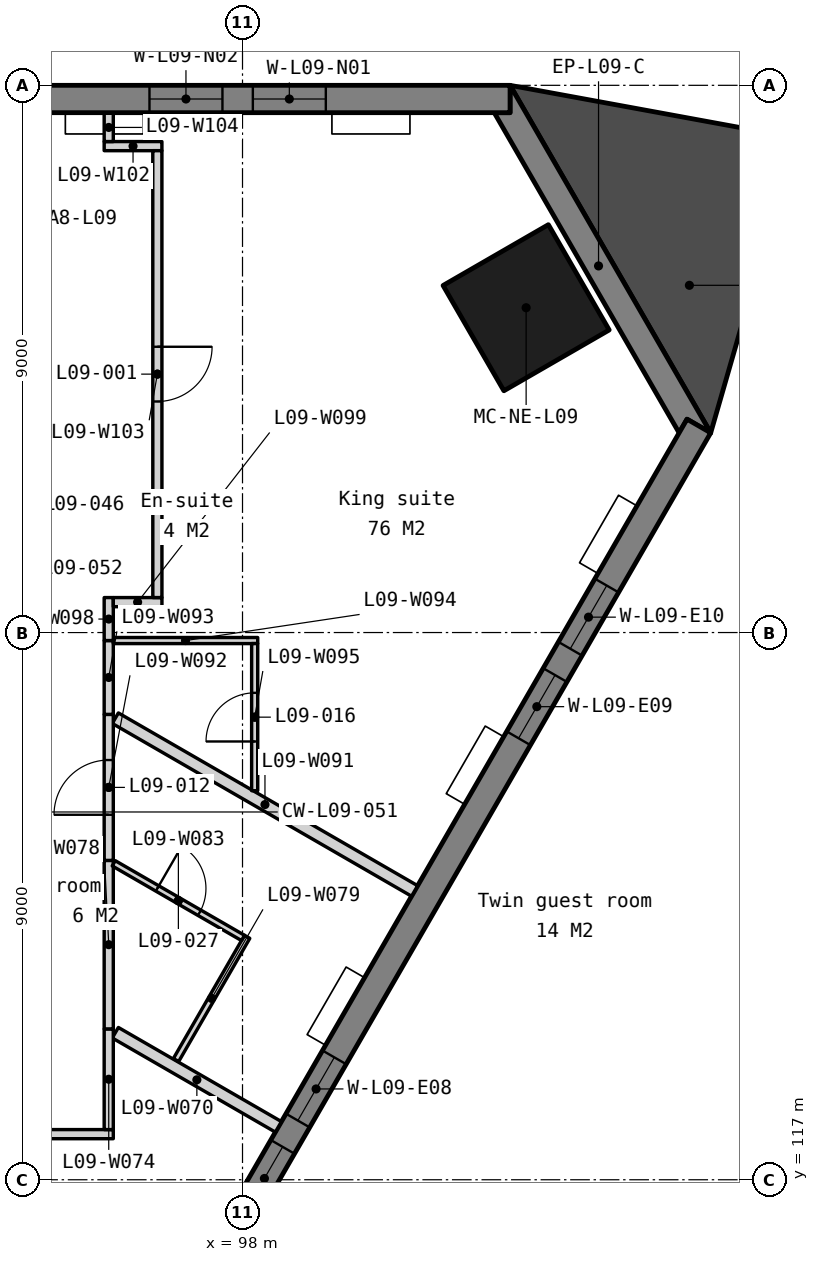
"""IFC4 building model, lengths in metres.
Left out: names, types, materials, properties, quantities, classifications, styles, units other than length and angle.
Written with IfcOpenShell. Run it as: python <this file> out.ifc"""

import sys

from ifc_helpers import new_model, si_unit, direction, frame, frame_2d, origin, origin_2d, place, context, subcontext, project, spatial, polyline, rectangle, outline, extrude, element, fill, save


model = new_model("IFC4")
c1 = context("Model", 3, precision=1e-05, world=origin(), true_north=direction((0.0, 1.0)))
c2 = subcontext(c1, "Body", "Model", "MODEL_VIEW")
j1 = project(units=[si_unit("LENGTHUNIT", "METRE"), si_unit("PLANEANGLEUNIT", "RADIAN")], contexts=[c1])
p1 = place(None, origin())
s1 = spatial("IfcSite", under=j1, at=p1, CompositionType="ELEMENT")
p2 = place(p1, origin())
s2 = spatial("IfcBuilding", under=s1, at=p2, CompositionType="ELEMENT")
p3 = place(p2, frame((0.0, 0.0, 45.5)))
s3 = spatial("IfcBuildingStorey", under=s2, at=p3, CompositionType="ELEMENT", Elevation=45.5)
p4 = place(p3, frame((102.664, 131.342, 0.0), z_axis=(0.0, 0.0, 1.0), x_axis=(-0.5, 0.866025403784, 0.0)))
e1 = element("IfcColumn", 1, at=p4, inside=s3, PredefinedType="COLUMN", context=c2, shape_type="SweptSolid", body=[
    extrude(rectangle(XDim=2.0, YDim=2.0, at=origin_2d()), origin(), (0.0, 0.0, 1.0), 3.5),
])
p5 = place(p3, frame((0.0, 0.0, -0.15)))
e2 = element("IfcWall", 2, at=p5, inside=s3, PredefinedType="SOLIDWALL", context=c2, shape_type="SweptSolid", body=[
    extrude(outline(polyline([(105.7, 129.284), (105.31, 129.509), (105.18, 129.284), (102.14, 134.55), (102.4, 134.55), (102.4, 135.0), (105.7, 129.284)])), origin(), (0.0, 0.0, 1.0), 3.5),
])
p6 = place(p3, frame((102.4, 134.775, -0.15), z_axis=(0.0, 0.0, 1.0), x_axis=(-1.0, 0.0, 0.0)))
e3 = element("IfcWall", 3, at=p6, inside=s3, PredefinedType="SOLIDWALL", context=c2, shape_type="SweptSolid", body=[
    extrude(outline(polyline([(0.0, 0.0), (0.0, 3.5), (38.62, 3.5), (38.62, 0.0), (0.0, 0.0)])), frame((0.0, 0.225, 0.0), z_axis=(0.0, -1.0, 0.0), x_axis=(1.0, 0.0, 0.0)), (0.0, 0.0, 1.0), 0.45),
])
p7 = place(p6, frame((3.03, 0.0, 1.05)))
e4 = element("IfcOpeningElement", 4, at=p7, cuts=e3, PredefinedType="OPENING", context=c2, shape_type="SweptSolid", body=[
    extrude(rectangle(XDim=1.2, YDim=1.5, at=frame_2d((0.6, 0.75))), frame((0.0, 0.235, 0.0), z_axis=(0.0, -1.0, 0.0), x_axis=(1.0, 0.0, 0.0)), (0.0, 0.0, 1.0), 0.47),
])
p8 = place(p6, frame((4.73, 0.0, 1.05)))
e5 = element("IfcOpeningElement", 5, at=p8, cuts=e3, PredefinedType="OPENING", context=c2, shape_type="SweptSolid", body=[
    extrude(rectangle(XDim=1.2, YDim=1.5, at=frame_2d((0.6, 0.75))), frame((0.0, 0.235, 0.0), z_axis=(0.0, -1.0, 0.0), x_axis=(1.0, 0.0, 0.0)), (0.0, 0.0, 1.0), 0.47),
])
p9 = place(p6, frame((11.99, 0.0, 1.05)))
e6 = element("IfcOpeningElement", 6, at=p9, cuts=e3, PredefinedType="OPENING", context=c2, shape_type="SweptSolid", body=[
    extrude(rectangle(XDim=1.2, YDim=1.5, at=frame_2d((0.6, 0.75))), frame((0.0, 0.235, 0.0), z_axis=(0.0, -1.0, 0.0), x_axis=(1.0, 0.0, 0.0)), (0.0, 0.0, 1.0), 0.47),
])
p10 = place(p6, frame((13.69, 0.0, 1.05)))
e7 = element("IfcOpeningElement", 7, at=p10, cuts=e3, PredefinedType="OPENING", context=c2, shape_type="SweptSolid", body=[
    extrude(rectangle(XDim=1.2, YDim=1.5, at=frame_2d((0.6, 0.75))), frame((0.0, 0.235, 0.0), z_axis=(0.0, -1.0, 0.0), x_axis=(1.0, 0.0, 0.0)), (0.0, 0.0, 1.0), 0.47),
])
p11 = place(p6, frame((20.95, 0.0, 1.05)))
e8 = element("IfcOpeningElement", 8, at=p11, cuts=e3, PredefinedType="OPENING", context=c2, shape_type="SweptSolid", body=[
    extrude(rectangle(XDim=1.2, YDim=1.5, at=frame_2d((0.6, 0.75))), frame((0.0, 0.235, 0.0), z_axis=(0.0, -1.0, 0.0), x_axis=(1.0, 0.0, 0.0)), (0.0, 0.0, 1.0), 0.47),
])
p12 = place(p6, frame((22.65, 0.0, 1.05)))
e9 = element("IfcOpeningElement", 9, at=p12, cuts=e3, PredefinedType="OPENING", context=c2, shape_type="SweptSolid", body=[
    extrude(rectangle(XDim=1.2, YDim=1.5, at=frame_2d((0.6, 0.75))), frame((0.0, 0.235, 0.0), z_axis=(0.0, -1.0, 0.0), x_axis=(1.0, 0.0, 0.0)), (0.0, 0.0, 1.0), 0.47),
])
p13 = place(p6, frame((29.91, 0.0, 1.05)))
e10 = element("IfcOpeningElement", 10, at=p13, cuts=e3, PredefinedType="OPENING", context=c2, shape_type="SweptSolid", body=[
    extrude(rectangle(XDim=1.2, YDim=1.5, at=frame_2d((0.6, 0.75))), frame((0.0, 0.235, 0.0), z_axis=(0.0, -1.0, 0.0), x_axis=(1.0, 0.0, 0.0)), (0.0, 0.0, 1.0), 0.47),
])
p14 = place(p6, frame((31.61, 0.0, 1.05)))
e11 = element("IfcOpeningElement", 11, at=p14, cuts=e3, PredefinedType="OPENING", context=c2, shape_type="SweptSolid", body=[
    extrude(rectangle(XDim=1.2, YDim=1.5, at=frame_2d((0.6, 0.75))), frame((0.0, 0.235, 0.0), z_axis=(0.0, -1.0, 0.0), x_axis=(1.0, 0.0, 0.0)), (0.0, 0.0, 1.0), 0.47),
])
p15 = place(p3, frame((83.105, 90.599, -0.15), z_axis=(0.0, 0.0, 1.0), x_axis=(0.499999201451, 0.866025864826, 0.0)))
e12 = element("IfcWall", 12, at=p15, inside=s3, PredefinedType="SOLIDWALL", context=c2, shape_type="SweptSolid", body=[
    extrude(outline(polyline([(44.8, 0.0), (44.8, 3.5), (0.0, 3.5), (0.0, 0.0), (44.8, 0.0)])), frame((0.0, 0.225, 0.0), z_axis=(0.0, -1.0, 0.0), x_axis=(1.0, 0.0, 0.0)), (0.0, 0.0, 1.0), 0.45),
])
p16 = place(p15, frame((3.03, 0.0, 1.05)))
e13 = element("IfcOpeningElement", 13, at=p16, cuts=e12, PredefinedType="OPENING", context=c2, shape_type="SweptSolid", body=[
    extrude(rectangle(XDim=1.2, YDim=1.5, at=frame_2d((0.6, 0.75))), frame((0.0, 0.235, 0.0), z_axis=(0.0, -1.0, 0.0), x_axis=(1.0, 0.0, 0.0)), (0.0, 0.0, 1.0), 0.47),
])
p17 = place(p15, frame((4.73, 0.0, 1.05)))
e14 = element("IfcOpeningElement", 14, at=p17, cuts=e12, PredefinedType="OPENING", context=c2, shape_type="SweptSolid", body=[
    extrude(rectangle(XDim=1.2, YDim=1.5, at=frame_2d((0.6, 0.75))), frame((0.0, 0.235, 0.0), z_axis=(0.0, -1.0, 0.0), x_axis=(1.0, 0.0, 0.0)), (0.0, 0.0, 1.0), 0.47),
])
p18 = place(p15, frame((11.99, 0.0, 1.05)))
e15 = element("IfcOpeningElement", 15, at=p18, cuts=e12, PredefinedType="OPENING", context=c2, shape_type="SweptSolid", body=[
    extrude(rectangle(XDim=1.2, YDim=1.5, at=frame_2d((0.6, 0.75))), frame((0.0, 0.235, 0.0), z_axis=(0.0, -1.0, 0.0), x_axis=(1.0, 0.0, 0.0)), (0.0, 0.0, 1.0), 0.47),
])
p19 = place(p15, frame((13.69, 0.0, 1.05)))
e16 = element("IfcOpeningElement", 16, at=p19, cuts=e12, PredefinedType="OPENING", context=c2, shape_type="SweptSolid", body=[
    extrude(rectangle(XDim=1.2, YDim=1.5, at=frame_2d((0.6, 0.75))), frame((0.0, 0.235, 0.0), z_axis=(0.0, -1.0, 0.0), x_axis=(1.0, 0.0, 0.0)), (0.0, 0.0, 1.0), 0.47),
])
p20 = place(p15, frame((20.95, 0.0, 1.05)))
e17 = element("IfcOpeningElement", 17, at=p20, cuts=e12, PredefinedType="OPENING", context=c2, shape_type="SweptSolid", body=[
    extrude(rectangle(XDim=1.2, YDim=1.5, at=frame_2d((0.6, 0.75))), frame((0.0, 0.235, 0.0), z_axis=(0.0, -1.0, 0.0), x_axis=(1.0, 0.0, 0.0)), (0.0, 0.0, 1.0), 0.47),
])
p21 = place(p15, frame((22.65, 0.0, 1.05)))
e18 = element("IfcOpeningElement", 18, at=p21, cuts=e12, PredefinedType="OPENING", context=c2, shape_type="SweptSolid", body=[
    extrude(rectangle(XDim=1.2, YDim=1.5, at=frame_2d((0.6, 0.75))), frame((0.0, 0.235, 0.0), z_axis=(0.0, -1.0, 0.0), x_axis=(1.0, 0.0, 0.0)), (0.0, 0.0, 1.0), 0.47),
])
p22 = place(p15, frame((29.91, 0.0, 1.05)))
e19 = element("IfcOpeningElement", 19, at=p22, cuts=e12, PredefinedType="OPENING", context=c2, shape_type="SweptSolid", body=[
    extrude(rectangle(XDim=1.2, YDim=1.5, at=frame_2d((0.6, 0.75))), frame((0.0, 0.235, 0.0), z_axis=(0.0, -1.0, 0.0), x_axis=(1.0, 0.0, 0.0)), (0.0, 0.0, 1.0), 0.47),
])
p23 = place(p15, frame((31.61, 0.0, 1.05)))
e20 = element("IfcOpeningElement", 20, at=p23, cuts=e12, PredefinedType="OPENING", context=c2, shape_type="SweptSolid", body=[
    extrude(rectangle(XDim=1.2, YDim=1.5, at=frame_2d((0.6, 0.75))), frame((0.0, 0.235, 0.0), z_axis=(0.0, -1.0, 0.0), x_axis=(1.0, 0.0, 0.0)), (0.0, 0.0, 1.0), 0.47),
])
p24 = place(p15, frame((38.87, 0.0, 1.05)))
e21 = element("IfcOpeningElement", 21, at=p24, cuts=e12, PredefinedType="OPENING", context=c2, shape_type="SweptSolid", body=[
    extrude(rectangle(XDim=1.2, YDim=1.5, at=frame_2d((0.6, 0.75))), frame((0.0, 0.235, 0.0), z_axis=(0.0, -1.0, 0.0), x_axis=(1.0, 0.0, 0.0)), (0.0, 0.0, 1.0), 0.47),
])
p25 = place(p15, frame((40.57, 0.0, 1.05)))
e22 = element("IfcOpeningElement", 22, at=p25, cuts=e12, PredefinedType="OPENING", context=c2, shape_type="SweptSolid", body=[
    extrude(rectangle(XDim=1.2, YDim=1.5, at=frame_2d((0.6, 0.75))), frame((0.0, 0.235, 0.0), z_axis=(0.0, -1.0, 0.0), x_axis=(1.0, 0.0, 0.0)), (0.0, 0.0, 1.0), 0.47),
])
p26 = place(p3, frame((0.0, 0.0, -0.15)))
e23 = element("IfcWall", 23, at=p26, inside=s3, PredefinedType="SOLIDWALL", context=c2, shape_type="SweptSolid", body=[
    extrude(outline(polyline([(105.7, 129.284), (107.1, 134.137), (102.4, 135.0), (105.7, 129.284)])), origin(), (0.0, 0.0, 1.0), 3.5),
])
p27 = place(p3, frame((90.626, 117.75, 0.0), z_axis=(0.0, 0.0, 1.0), x_axis=(1.0, 0.0, 0.0)))
e24 = element("IfcWall", 24, at=p27, inside=s3, PredefinedType="PARTITIONING", context=c2, shape_type="SweptSolid", body=[
    extrude(rectangle(XDim=5.249, YDim=0.15, at=frame_2d((2.625, 0.0))), origin(), (0.0, 0.0, 1.0), 3.35),
])
p28 = place(p27, frame((2.125, 0.0, 0.0)))
e25 = element("IfcOpeningElement", 25, at=p28, cuts=e24, PredefinedType="OPENING", context=c2, shape_type="SweptSolid", body=[
    extrude(rectangle(XDim=1.0, YDim=2.1, at=frame_2d((0.5, 1.05))), frame((0.0, 0.085, 0.0), z_axis=(0.0, -1.0, 0.0), x_axis=(1.0, 0.0, 0.0)), (0.0, 0.0, 1.0), 0.17),
])
p29 = place(p3, frame((95.908, 119.418, 0.0), z_axis=(0.0, 0.0, 1.0), x_axis=(0.866051688794, -0.499954470265, 0.0)))
e26 = element("IfcWall", 26, at=p29, inside=s3, PredefinedType="PARTITIONING", context=c2, shape_type="SweptSolid", body=[
    extrude(rectangle(XDim=3.097, YDim=0.2, at=frame_2d((1.548, 0.0))), origin(), (0.0, 0.0, 1.0), 3.35),
])
p30 = place(p3, frame((95.8, 117.825, 0.0), z_axis=(0.0, 0.0, 1.0), x_axis=(0.0, 1.0, 0.0)))
e27 = element("IfcWall", 27, at=p30, inside=s3, PredefinedType="PARTITIONING", context=c2, shape_type="SweptSolid", body=[
    extrude(rectangle(XDim=1.656, YDim=0.15, at=frame_2d((0.828, 0.0))), origin(), (0.0, 0.0, 1.0), 3.35),
])
p31 = place(p3, frame((95.8, 119.481, 0.0), z_axis=(0.0, 0.0, 1.0), x_axis=(0.0, 1.0, 0.0)))
e28 = element("IfcWall", 28, at=p31, inside=s3, PredefinedType="PARTITIONING", context=c2, shape_type="SweptSolid", body=[
    extrude(rectangle(XDim=2.771, YDim=0.15, at=frame_2d((1.386, 0.0))), origin(), (0.0, 0.0, 1.0), 3.35),
])
p32 = place(p3, frame((96.907, 118.969, 0.0), z_axis=(0.0, 0.0, 1.0), x_axis=(0.499999433879, 0.866025730634, 0.0)))
e29 = element("IfcWall", 29, at=p32, inside=s3, PredefinedType="PARTITIONING", context=c2, shape_type="SweptSolid", body=[
    extrude(rectangle(XDim=2.34, YDim=0.1, at=frame_2d((1.17, 0.0))), origin(), (0.0, 0.0, 1.0), 2.887),
])
p33 = place(p3, frame((95.882, 122.205, 0.0), z_axis=(0.0, 0.0, 1.0), x_axis=(0.866006720078, -0.500032359733, 0.0)))
e30 = element("IfcWall", 30, at=p33, inside=s3, PredefinedType="PARTITIONING", context=c2, shape_type="SweptSolid", body=[
    extrude(rectangle(XDim=2.455, YDim=0.1, at=frame_2d((1.228, 0.0))), origin(), (0.0, 0.0, 1.0), 3.35),
])
p34 = place(p33, frame((0.827, 0.0, 0.0)))
e31 = element("IfcOpeningElement", 31, at=p34, cuts=e30, PredefinedType="OPENING", context=c2, shape_type="SweptSolid", body=[
    extrude(rectangle(XDim=0.8, YDim=2.1, at=frame_2d((0.4, 1.05))), frame((0.0, 0.06, 0.0), z_axis=(0.0, -1.0, 0.0), x_axis=(1.0, 0.0, 0.0)), (0.0, 0.0, 1.0), 0.12),
])
p35 = place(p3, frame((95.908, 124.591, 0.0), z_axis=(0.0, 0.0, 1.0), x_axis=(0.866043237112, -0.499969110498, 0.0)))
e32 = element("IfcWall", 32, at=p35, inside=s3, PredefinedType="PARTITIONING", context=c2, shape_type="SweptSolid", body=[
    extrude(rectangle(XDim=5.683, YDim=0.2, at=frame_2d((2.842, 0.0))), origin(), (0.0, 0.0, 1.0), 3.35),
])
p36 = place(p3, frame((95.8, 122.252, 0.0), z_axis=(0.0, 0.0, 1.0), x_axis=(0.0, 1.0, 0.0)))
e33 = element("IfcWall", 33, at=p36, inside=s3, PredefinedType="PARTITIONING", context=c2, shape_type="SweptSolid", body=[
    extrude(rectangle(XDim=2.402, YDim=0.15, at=frame_2d((1.201, 0.0))), origin(), (0.0, 0.0, 1.0), 3.35),
])
p37 = place(p36, frame((0.751, 0.0, 0.0)))
e34 = element("IfcOpeningElement", 34, at=p37, cuts=e33, PredefinedType="OPENING", context=c2, shape_type="SweptSolid", body=[
    extrude(rectangle(XDim=0.9, YDim=2.1, at=frame_2d((0.45, 1.05))), frame((0.0, 0.085, 0.0), z_axis=(0.0, -1.0, 0.0), x_axis=(1.0, 0.0, 0.0)), (0.0, 0.0, 1.0), 0.17),
])
p38 = place(p3, frame((95.8, 124.654, 0.0), z_axis=(0.0, 0.0, 1.0), x_axis=(0.0, 1.0, 0.0)))
e35 = element("IfcWall", 35, at=p38, inside=s3, PredefinedType="PARTITIONING", context=c2, shape_type="SweptSolid", body=[
    extrude(rectangle(XDim=1.214, YDim=0.15, at=frame_2d((0.607, 0.0))), origin(), (0.0, 0.0, 1.0), 3.35),
])
p39 = place(p3, frame((95.875, 125.868, 0.0), z_axis=(0.0, 0.0, 1.0), x_axis=(1.0, 0.0, 0.0)))
e36 = element("IfcWall", 36, at=p39, inside=s3, PredefinedType="PARTITIONING", context=c2, shape_type="SweptSolid", body=[
    extrude(rectangle(XDim=2.375, YDim=0.1, at=frame_2d((1.188, 0.0))), origin(), (0.0, 0.0, 1.0), 3.35),
])
p40 = place(p3, frame((98.2, 123.398, 0.0), z_axis=(0.0, 0.0, 1.0), x_axis=(0.0, 1.0, 0.0)))
e37 = element("IfcWall", 37, at=p40, inside=s3, PredefinedType="PARTITIONING", context=c2, shape_type="SweptSolid", body=[
    extrude(rectangle(XDim=2.42, YDim=0.1, at=frame_2d((1.21, 0.0))), origin(), (0.0, 0.0, 1.0), 3.35),
])
p41 = place(p40, frame((0.81, 0.0, 0.0)))
e38 = element("IfcOpeningElement", 38, at=p41, cuts=e37, PredefinedType="OPENING", context=c2, shape_type="SweptSolid", body=[
    extrude(rectangle(XDim=0.8, YDim=2.1, at=frame_2d((0.4, 1.05))), frame((0.0, 0.06, 0.0), z_axis=(0.0, -1.0, 0.0), x_axis=(1.0, 0.0, 0.0)), (0.0, 0.0, 1.0), 0.12),
])
p42 = place(p3, frame((95.8, 125.868, 0.0), z_axis=(0.0, 0.0, 1.0), x_axis=(0.0, 1.0, 0.0)))
e39 = element("IfcWall", 39, at=p42, inside=s3, PredefinedType="PARTITIONING", context=c2, shape_type="SweptSolid", body=[
    extrude(rectangle(XDim=0.707, YDim=0.15, at=frame_2d((0.354, 0.0))), origin(), (0.0, 0.0, 1.0), 3.35),
])
p43 = place(p3, frame((95.875, 126.5, 0.0), z_axis=(0.0, 0.0, 1.0), x_axis=(1.0, 0.0, 0.0)))
e40 = element("IfcWall", 40, at=p43, inside=s3, PredefinedType="PARTITIONING", context=c2, shape_type="SweptSolid", body=[
    extrude(rectangle(XDim=0.8, YDim=0.15, at=frame_2d((0.4, 0.0))), origin(), (0.0, 0.0, 1.0), 3.35),
])
p44 = place(p3, frame((95.725, 134.0, 0.0), z_axis=(0.0, 0.0, 1.0), x_axis=(1.0, 0.0, 0.0)))
e41 = element("IfcWall", 41, at=p44, inside=s3, PredefinedType="PARTITIONING", context=c2, shape_type="SweptSolid", body=[
    extrude(rectangle(XDim=0.949, YDim=0.15, at=frame_2d((0.475, 0.0))), origin(), (0.0, 0.0, 1.0), 2.887),
])
p45 = place(p3, frame((96.6, 133.925, 0.0), z_axis=(0.0, 0.0, 1.0), x_axis=(6.643194e-05, -0.999999997793, 0.0)))
e42 = element("IfcWall", 42, at=p45, inside=s3, PredefinedType="PARTITIONING", context=c2, shape_type="SweptSolid", body=[
    extrude(rectangle(XDim=7.35, YDim=0.15, at=frame_2d((3.675, 0.0))), origin(), (0.0, 0.0, 1.0), 3.35),
])
p46 = place(p45, frame((3.225, 0.0, 0.0)))
e43 = element("IfcOpeningElement", 43, at=p46, cuts=e42, PredefinedType="OPENING", context=c2, shape_type="SweptSolid", body=[
    extrude(rectangle(XDim=0.9, YDim=2.1, at=frame_2d((0.45, 1.05))), frame((0.0, 0.085, 0.0), z_axis=(0.0, -1.0, 0.0), x_axis=(1.0, 0.0, 0.0)), (0.0, 0.0, 1.0), 0.17),
])
p47 = place(p3, frame((95.8, 134.075, 0.0), z_axis=(0.0, 0.0, 1.0), x_axis=(0.0, 1.0, 0.0)))
e44 = element("IfcWall", 44, at=p47, inside=s3, PredefinedType="PARTITIONING", context=c2, shape_type="SweptSolid", body=[
    extrude(rectangle(XDim=0.465, YDim=0.15, at=frame_2d((0.232, 0.0))), origin(), (0.0, 0.0, 1.0), 3.35),
])
p48 = place(p7, origin())
e45 = element("IfcWindow", 45, at=p48, inside=s3, PartitioningType="SINGLE_PANEL", PredefinedType="WINDOW", context=c2, shape_type="SweptSolid", body=[
    extrude(rectangle(XDim=1.2, YDim=1.5, at=frame_2d((0.6, 0.75))), frame((0.0, 0.03, 0.0), z_axis=(0.0, -1.0, 0.0), x_axis=(1.0, 0.0, 0.0)), (0.0, 0.0, 1.0), 0.06),
])
fill(e4, e45)
p49 = place(p8, origin())
e46 = element("IfcWindow", 46, at=p49, inside=s3, PartitioningType="SINGLE_PANEL", PredefinedType="WINDOW", context=c2, shape_type="SweptSolid", body=[
    extrude(rectangle(XDim=1.2, YDim=1.5, at=frame_2d((0.6, 0.75))), frame((0.0, 0.03, 0.0), z_axis=(0.0, -1.0, 0.0), x_axis=(1.0, 0.0, 0.0)), (0.0, 0.0, 1.0), 0.06),
])
fill(e5, e46)
p50 = place(p22, origin())
e47 = element("IfcWindow", 47, at=p50, inside=s3, PartitioningType="SINGLE_PANEL", PredefinedType="WINDOW", context=c2, shape_type="SweptSolid", body=[
    extrude(rectangle(XDim=1.2, YDim=1.5, at=frame_2d((0.6, 0.75))), frame((0.0, 0.03, 0.0), z_axis=(0.0, -1.0, 0.0), x_axis=(1.0, 0.0, 0.0)), (0.0, 0.0, 1.0), 0.06),
])
fill(e19, e47)
p51 = place(p23, origin())
e48 = element("IfcWindow", 48, at=p51, inside=s3, PartitioningType="SINGLE_PANEL", PredefinedType="WINDOW", context=c2, shape_type="SweptSolid", body=[
    extrude(rectangle(XDim=1.2, YDim=1.5, at=frame_2d((0.6, 0.75))), frame((0.0, 0.03, 0.0), z_axis=(0.0, -1.0, 0.0), x_axis=(1.0, 0.0, 0.0)), (0.0, 0.0, 1.0), 0.06),
])
fill(e20, e48)
p52 = place(p24, origin())
e49 = element("IfcWindow", 49, at=p52, inside=s3, PartitioningType="SINGLE_PANEL", PredefinedType="WINDOW", context=c2, shape_type="SweptSolid", body=[
    extrude(rectangle(XDim=1.2, YDim=1.5, at=frame_2d((0.6, 0.75))), frame((0.0, 0.03, 0.0), z_axis=(0.0, -1.0, 0.0), x_axis=(1.0, 0.0, 0.0)), (0.0, 0.0, 1.0), 0.06),
])
fill(e21, e49)
p53 = place(p25, origin())
e50 = element("IfcWindow", 50, at=p53, inside=s3, PartitioningType="SINGLE_PANEL", PredefinedType="WINDOW", context=c2, shape_type="SweptSolid", body=[
    extrude(rectangle(XDim=1.2, YDim=1.5, at=frame_2d((0.6, 0.75))), frame((0.0, 0.03, 0.0), z_axis=(0.0, -1.0, 0.0), x_axis=(1.0, 0.0, 0.0)), (0.0, 0.0, 1.0), 0.06),
])
fill(e22, e50)
p54 = place(p46, origin())
e51 = element("IfcDoor", 51, at=p54, inside=s3, OperationType="SINGLE_SWING_LEFT", PredefinedType="DOOR", context=c2, shape_type="SweptSolid", body=[
    extrude(rectangle(XDim=0.9, YDim=2.1, at=frame_2d((0.45, 1.05))), frame((0.0, 0.025, 0.0), z_axis=(0.0, -1.0, 0.0), x_axis=(1.0, 0.0, 0.0)), (0.0, 0.0, 1.0), 0.05),
])
fill(e43, e51)
p55 = place(p37, origin())
e52 = element("IfcDoor", 52, at=p55, inside=s3, OperationType="SINGLE_SWING_LEFT", PredefinedType="DOOR", context=c2, shape_type="SweptSolid", body=[
    extrude(rectangle(XDim=0.9, YDim=2.1, at=frame_2d((0.45, 1.05))), frame((0.0, 0.025, 0.0), z_axis=(0.0, -1.0, 0.0), x_axis=(1.0, 0.0, 0.0)), (0.0, 0.0, 1.0), 0.05),
])
fill(e34, e52)
p56 = place(p41, origin())
e53 = element("IfcDoor", 53, at=p56, inside=s3, OperationType="SINGLE_SWING_LEFT", PredefinedType="DOOR", context=c2, shape_type="SweptSolid", body=[
    extrude(rectangle(XDim=0.8, YDim=2.1, at=frame_2d((0.4, 1.05))), frame((0.0, 0.025, 0.0), z_axis=(0.0, -1.0, 0.0), x_axis=(1.0, 0.0, 0.0)), (0.0, 0.0, 1.0), 0.05),
])
fill(e38, e53)
p57 = place(p34, origin())
e54 = element("IfcDoor", 54, at=p57, inside=s3, OperationType="SINGLE_SWING_LEFT", PredefinedType="DOOR", context=c2, shape_type="SweptSolid", body=[
    extrude(rectangle(XDim=0.8, YDim=2.1, at=frame_2d((0.4, 1.05))), frame((0.0, 0.025, 0.0), z_axis=(0.0, -1.0, 0.0), x_axis=(1.0, 0.0, 0.0)), (0.0, 0.0, 1.0), 0.05),
])
fill(e31, e54)
save(model, sys.argv[1])
